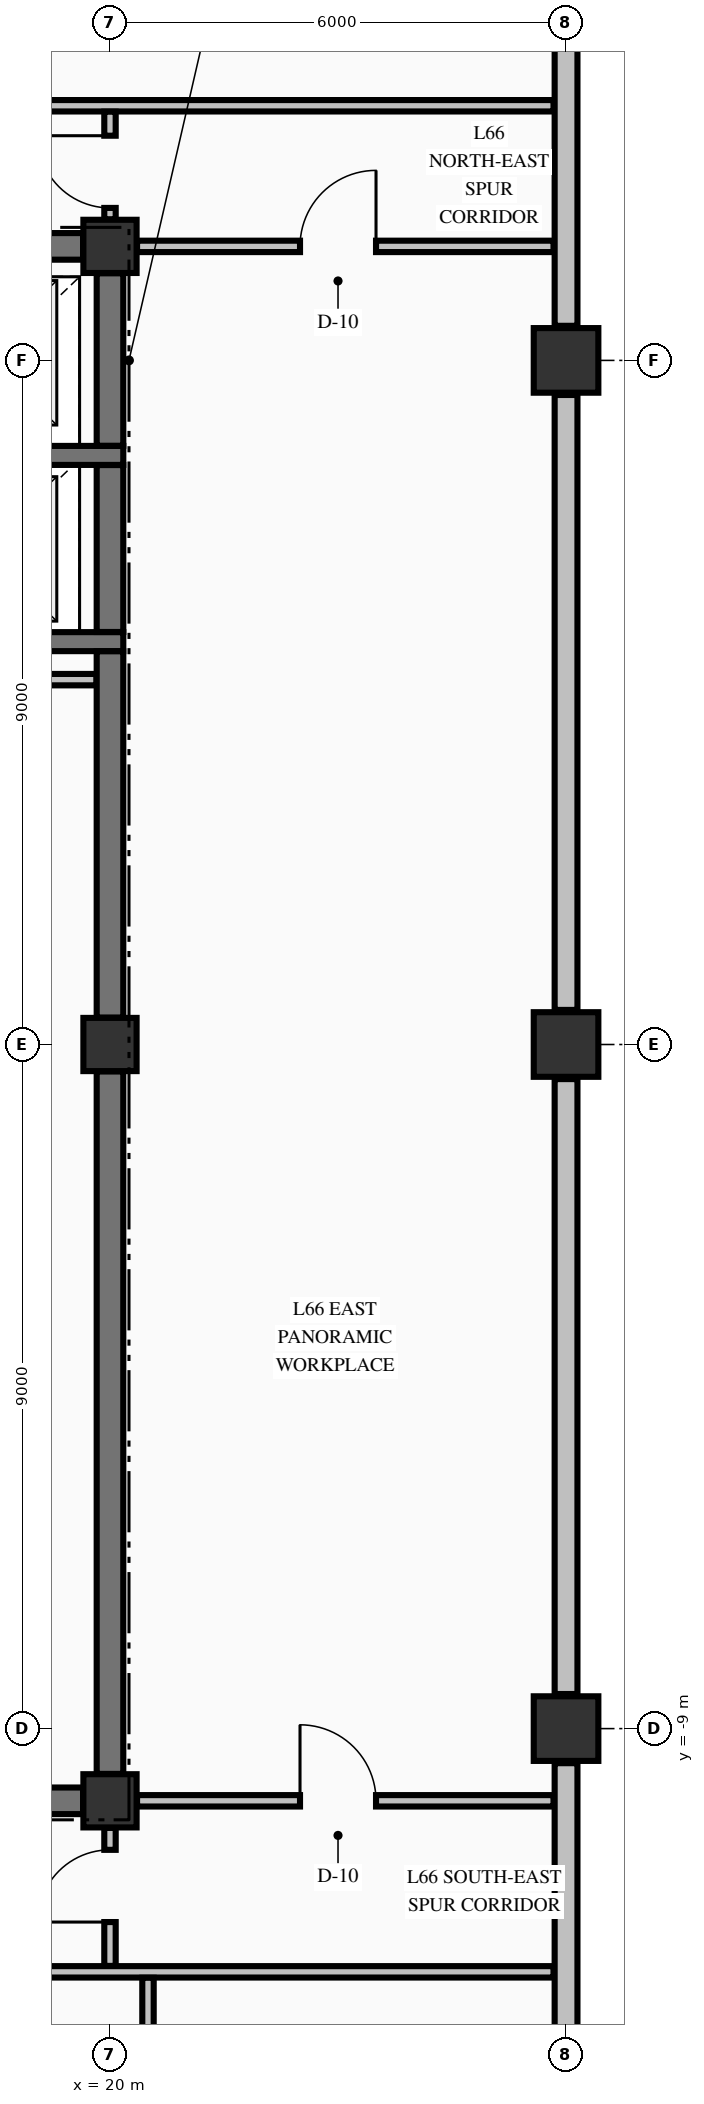
"""IFC4 building model, lengths in metres.
Left out: names, types, materials, properties, quantities, classifications, styles, units other than length and angle.
Written with IfcOpenShell. Run it as: python <this file> out.ifc"""

import sys

from ifc_helpers import new_model, si_unit, direction, frame, frame_2d, origin, origin_2d, place, context, subcontext, project, spatial, rectangle, extrude, element, fill, save


model = new_model("IFC4")
c1 = context("Model", 3, precision=1e-05, world=origin(), true_north=direction((0.0, 1.0)))
c2 = subcontext(c1, "Body", "Model", "MODEL_VIEW")
j1 = project(units=[si_unit("LENGTHUNIT", "METRE"), si_unit("PLANEANGLEUNIT", "RADIAN")], contexts=[c1])
p1 = place(None, origin())
s1 = spatial("IfcSite", under=j1, at=p1, CompositionType="ELEMENT")
p2 = place(p1, origin())
s2 = spatial("IfcBuilding", under=s1, at=p2, CompositionType="ELEMENT")
p3 = place(p2, frame((0.0, 0.0, 249.43)))
s3 = spatial("IfcBuildingStorey", under=s2, at=p3, CompositionType="ELEMENT", Elevation=249.43)
for number, where, z_axis, x_axis in (
    (1, (26.0, -9.0, -0.425), (0.0, 0.0, 1.0), (1.0, 0.0, 0.0)),
    (2, (26.0, 0.0, -0.425), (0.0, 0.0, 1.0), (1.0, 0.0, 0.0)),
    (3, (26.0, 9.0, -0.425), (0.0, 0.0, 1.0), (1.0, 0.0, 0.0)),
):
    element("IfcColumn", number, at=place(p3, frame(where, z_axis=z_axis, x_axis=x_axis)), inside=s3, PredefinedType="COLUMN", context=c2, shape_type="SweptSolid", body=[
        extrude(rectangle(XDim=0.85, YDim=0.85, at=origin_2d()), origin(), (0.0, 0.0, 1.0), 5.0),
    ])
for number, where, z_axis, x_axis in (
    (4, (20.0, -9.95, -0.425), (0.0, 0.0, 1.0), (1.0, 0.0, 0.0)),
    (5, (20.0, 10.5, -0.425), (0.0, 0.0, 1.0), (1.0, 0.0, 0.0)),
    (6, (20.0, 0.0, -0.425), (0.0, 0.0, 1.0), (1.0, 0.0, 0.0)),
):
    element("IfcColumn", number, at=place(p3, frame(where, z_axis=z_axis, x_axis=x_axis)), inside=s3, PredefinedType="COLUMN", context=c2, shape_type="SweptSolid", body=[
        extrude(rectangle(XDim=0.7, YDim=0.7, at=origin_2d()), origin(), (0.0, 0.0, 1.0), 5.0),
    ])
for number, where, z_axis, x_axis in (
    (7, (26.0, -17.545, 0.0), (0.0, 0.0, 1.0), (0.0, 1.0, 0.0)),
    (8, (26.0, -8.545, 0.0), (0.0, 0.0, 1.0), (0.0, 1.0, 0.0)),
    (9, (26.0, 0.455, 0.0), (0.0, 0.0, 1.0), (0.0, 1.0, 0.0)),
    (10, (26.0, 9.455, 0.0), (0.0, 0.0, 1.0), (0.0, 1.0, 0.0)),
):
    element("IfcWall", number, at=place(p3, frame(where, z_axis=z_axis, x_axis=x_axis)), inside=s3, PredefinedType="STANDARD", context=c2, shape_type="SweptSolid", body=[
        extrude(rectangle(XDim=8.09, YDim=0.3, at=frame_2d((4.045, 0.0))), origin(), (0.0, 0.0, 1.0), 2.167),
    ])
p4 = place(p3, frame((14.7, -9.95, 0.0), z_axis=(0.0, 0.0, 1.0), x_axis=(1.0, 0.0, 0.0)))
e11 = element("IfcWall", 11, at=p4, inside=s3, PredefinedType="SHEAR", context=c2, shape_type="SweptSolid", body=[
    extrude(rectangle(XDim=4.946, YDim=0.35, at=frame_2d((2.473, 0.0))), origin(), (0.0, 0.0, 1.0), 4.575),
])
p5 = place(p4, frame((2.125, 0.0, 0.0)))
e12 = element("IfcOpeningElement", 12, at=p5, cuts=e11, PredefinedType="OPENING", context=c2, shape_type="SweptSolid", body=[
    extrude(rectangle(XDim=1.05, YDim=2.15, at=frame_2d((0.525, 1.075))), frame((0.0, 0.185, 0.0), z_axis=(0.0, -1.0, 0.0), x_axis=(1.0, 0.0, 0.0)), (0.0, 0.0, 1.0), 0.37),
])
for number, where, z_axis, x_axis in (
    (13, (17.025, 5.3, 0.0), (0.0, 0.0, 1.0), (1.0, 0.0, 0.0)),
    (14, (17.025, 7.75, 0.0), (0.0, 0.0, 1.0), (1.0, 0.0, 0.0)),
):
    element("IfcWall", number, at=place(p3, frame(where, z_axis=z_axis, x_axis=x_axis)), inside=s3, PredefinedType="SOLIDWALL", context=c2, shape_type="SweptSolid", body=[
        extrude(rectangle(XDim=3.15, YDim=0.25, at=frame_2d((1.575, 0.0))), origin(), (0.0, 0.0, 1.0), 4.575),
    ])
p6 = place(p3, frame((14.7, 10.5, 0.0), z_axis=(0.0, 0.0, 1.0), x_axis=(1.0, 0.0, 0.0)))
e15 = element("IfcWall", 15, at=p6, inside=s3, PredefinedType="SHEAR", context=c2, shape_type="SweptSolid", body=[
    extrude(rectangle(XDim=4.946, YDim=0.35, at=frame_2d((2.473, 0.0))), origin(), (0.0, 0.0, 1.0), 4.575),
])
p7 = place(p6, frame((0.7, 0.0, 0.0)))
e16 = element("IfcOpeningElement", 16, at=p7, cuts=e15, PredefinedType="OPENING", context=c2, shape_type="SweptSolid", body=[
    extrude(rectangle(XDim=1.1, YDim=2.15, at=frame_2d((0.55, 1.075))), frame((0.0, 0.185, 0.0), z_axis=(0.0, -1.0, 0.0), x_axis=(1.0, 0.0, 0.0)), (0.0, 0.0, 1.0), 0.37),
])
p8 = place(p3, frame((-20.075, -12.2, 0.0), z_axis=(0.0, 0.0, 1.0), x_axis=(1.0, 0.0, 0.0)))
e17 = element("IfcWall", 17, at=p8, inside=s3, PredefinedType="PARTITIONING", context=c2, shape_type="SweptSolid", body=[
    extrude(rectangle(XDim=45.91, YDim=0.15, at=frame_2d((22.955, 0.0))), origin(), (0.0, 0.0, 1.0), 4.575),
])
p9 = place(p8, frame((11.88, 0.0, 0.0)))
e18 = element("IfcOpeningElement", 18, at=p9, cuts=e17, PredefinedType="OPENING", context=c2, shape_type="SweptSolid", body=[
    extrude(rectangle(XDim=1.05, YDim=2.15, at=frame_2d((0.525, 1.075))), frame((0.0, 0.085, 0.0), z_axis=(0.0, -1.0, 0.0), x_axis=(1.0, 0.0, 0.0)), (0.0, 0.0, 1.0), 0.17),
])
p10 = place(p8, frame((25.0, 0.0, 0.0)))
e19 = element("IfcOpeningElement", 19, at=p10, cuts=e17, PredefinedType="OPENING", context=c2, shape_type="SweptSolid", body=[
    extrude(rectangle(XDim=1.05, YDim=2.15, at=frame_2d((0.525, 1.075))), frame((0.0, 0.085, 0.0), z_axis=(0.0, -1.0, 0.0), x_axis=(1.0, 0.0, 0.0)), (0.0, 0.0, 1.0), 0.17),
])
p11 = place(p8, frame((34.83, 0.0, 0.0)))
e20 = element("IfcOpeningElement", 20, at=p11, cuts=e17, PredefinedType="OPENING", context=c2, shape_type="SweptSolid", body=[
    extrude(rectangle(XDim=1.05, YDim=2.15, at=frame_2d((0.525, 1.075))), frame((0.0, 0.085, 0.0), z_axis=(0.0, -1.0, 0.0), x_axis=(1.0, 0.0, 0.0)), (0.0, 0.0, 1.0), 0.17),
])
p12 = place(p3, frame((20.356, -9.95, 0.0), z_axis=(0.0, 0.0, 1.0), x_axis=(1.0, 0.0, 0.0)))
e21 = element("IfcWall", 21, at=p12, inside=s3, PredefinedType="PARTITIONING", context=c2, shape_type="SweptSolid", body=[
    extrude(rectangle(XDim=5.479, YDim=0.15, at=frame_2d((2.74, 0.0))), origin(), (0.0, 0.0, 1.0), 4.575),
])
p13 = place(p12, frame((2.144, 0.0, 0.0)))
e22 = element("IfcOpeningElement", 22, at=p13, cuts=e21, PredefinedType="OPENING", context=c2, shape_type="SweptSolid", body=[
    extrude(rectangle(XDim=1.0, YDim=2.15, at=frame_2d((0.5, 1.075))), frame((0.0, 0.085, 0.0), z_axis=(0.0, -1.0, 0.0), x_axis=(1.0, 0.0, 0.0)), (0.0, 0.0, 1.0), 0.17),
])
p14 = place(p3, frame((14.878, 4.8, 0.0), z_axis=(0.0, 0.0, 1.0), x_axis=(1.0, 0.0, 0.0)))
e23 = element("IfcWall", 23, at=p14, inside=s3, PredefinedType="PARTITIONING", context=c2, shape_type="SweptSolid", body=[
    extrude(rectangle(XDim=4.944, YDim=0.15, at=frame_2d((2.472, 0.0))), origin(), (0.0, 0.0, 1.0), 4.575),
])
p15 = place(p3, frame((20.356, 10.5, 0.0), z_axis=(0.0, 0.0, 1.0), x_axis=(1.0, 0.0, 0.0)))
e24 = element("IfcWall", 24, at=p15, inside=s3, PredefinedType="PARTITIONING", context=c2, shape_type="SweptSolid", body=[
    extrude(rectangle(XDim=5.479, YDim=0.15, at=frame_2d((2.74, 0.0))), origin(), (0.0, 0.0, 1.0), 4.575),
])
p16 = place(p15, frame((2.144, 0.0, 0.0)))
e25 = element("IfcOpeningElement", 25, at=p16, cuts=e24, PredefinedType="OPENING", context=c2, shape_type="SweptSolid", body=[
    extrude(rectangle(XDim=1.0, YDim=2.15, at=frame_2d((0.5, 1.075))), frame((0.0, 0.085, 0.0), z_axis=(0.0, -1.0, 0.0), x_axis=(1.0, 0.0, 0.0)), (0.0, 0.0, 1.0), 0.17),
])
p17 = place(p3, frame((-20.075, 12.35, 0.0), z_axis=(0.0, 0.0, 1.0), x_axis=(1.0, 0.0, 0.0)))
e26 = element("IfcWall", 26, at=p17, inside=s3, PredefinedType="PARTITIONING", context=c2, shape_type="SweptSolid", body=[
    extrude(rectangle(XDim=45.91, YDim=0.15, at=frame_2d((22.955, 0.0))), origin(), (0.0, 0.0, 1.0), 2.167),
])
p18 = place(p17, frame((5.75, 0.0, 0.0)))
e27 = element("IfcOpeningElement", 27, at=p18, cuts=e26, PredefinedType="OPENING", context=c2, shape_type="SweptSolid", body=[
    extrude(rectangle(XDim=0.95, YDim=2.02, at=frame_2d((0.475, 1.01))), frame((0.0, 0.085, 0.0), z_axis=(0.0, -1.0, 0.0), x_axis=(1.0, 0.0, 0.0)), (0.0, 0.0, 1.0), 0.17),
])
p19 = place(p17, frame((17.35, 0.0, 0.0)))
e28 = element("IfcOpeningElement", 28, at=p19, cuts=e26, PredefinedType="OPENING", context=c2, shape_type="SweptSolid", body=[
    extrude(rectangle(XDim=0.95, YDim=2.02, at=frame_2d((0.475, 1.01))), frame((0.0, 0.085, 0.0), z_axis=(0.0, -1.0, 0.0), x_axis=(1.0, 0.0, 0.0)), (0.0, 0.0, 1.0), 0.17),
])
p20 = place(p17, frame((32.55, 0.0, 0.0)))
e29 = element("IfcOpeningElement", 29, at=p20, cuts=e26, PredefinedType="OPENING", context=c2, shape_type="SweptSolid", body=[
    extrude(rectangle(XDim=0.95, YDim=2.02, at=frame_2d((0.475, 1.01))), frame((0.0, 0.085, 0.0), z_axis=(0.0, -1.0, 0.0), x_axis=(1.0, 0.0, 0.0)), (0.0, 0.0, 1.0), 0.17),
])
p21 = place(p3, frame((20.0, -9.596, 0.0), z_axis=(0.0, 0.0, 1.0), x_axis=(0.0, 1.0, 0.0)))
e30 = element("IfcWall", 30, at=p21, inside=s3, PredefinedType="SHEAR", context=c2, shape_type="SweptSolid", body=[
    extrude(rectangle(XDim=9.242, YDim=0.35, at=frame_2d((4.621, 0.0))), origin(), (0.0, 0.0, 1.0), 4.575),
])
p22 = place(p3, frame((20.0, 0.354, 0.0), z_axis=(0.0, 0.0, 1.0), x_axis=(0.0, 1.0, 0.0)))
e31 = element("IfcWall", 31, at=p22, inside=s3, PredefinedType="SHEAR", context=c2, shape_type="SweptSolid", body=[
    extrude(rectangle(XDim=4.819, YDim=0.35, at=frame_2d((2.41, 0.0))), origin(), (0.0, 0.0, 1.0), 4.575),
])
p23 = place(p3, frame((20.0, 5.427, 0.0), z_axis=(0.0, 0.0, 1.0), x_axis=(0.0, 1.0, 0.0)))
e32 = element("IfcWall", 32, at=p23, inside=s3, PredefinedType="SHEAR", context=c2, shape_type="SweptSolid", body=[
    extrude(rectangle(XDim=2.196, YDim=0.35, at=frame_2d((1.098, 0.0))), origin(), (0.0, 0.0, 1.0), 4.575),
])
p24 = place(p3, frame((20.0, 7.877, 0.0), z_axis=(0.0, 0.0, 1.0), x_axis=(0.0, 1.0, 0.0)))
e33 = element("IfcWall", 33, at=p24, inside=s3, PredefinedType="SHEAR", context=c2, shape_type="SweptSolid", body=[
    extrude(rectangle(XDim=2.269, YDim=0.35, at=frame_2d((1.135, 0.0))), origin(), (0.0, 0.0, 1.0), 4.575),
])
p25 = place(p3, frame((20.0, -12.122, 0.0), z_axis=(0.0, 0.0, 1.0), x_axis=(0.0, 1.0, 0.0)))
e34 = element("IfcWall", 34, at=p25, inside=s3, PredefinedType="PARTITIONING", context=c2, shape_type="SweptSolid", body=[
    extrude(rectangle(XDim=1.816, YDim=0.15, at=frame_2d((0.908, 0.0))), origin(), (0.0, 0.0, 1.0), 4.575),
])
p26 = place(p25, frame((0.577, 0.0, 0.0)))
e35 = element("IfcOpeningElement", 35, at=p26, cuts=e34, PredefinedType="OPENING", context=c2, shape_type="SweptSolid", body=[
    extrude(rectangle(XDim=0.95, YDim=2.02, at=frame_2d((0.475, 1.01))), frame((0.0, 0.085, 0.0), z_axis=(0.0, -1.0, 0.0), x_axis=(1.0, 0.0, 0.0)), (0.0, 0.0, 1.0), 0.17),
])
p27 = place(p3, frame((20.0, 10.856, 0.0), z_axis=(0.0, 0.0, 1.0), x_axis=(0.0, 1.0, 0.0)))
e36 = element("IfcWall", 36, at=p27, inside=s3, PredefinedType="PARTITIONING", context=c2, shape_type="SweptSolid", body=[
    extrude(rectangle(XDim=1.416, YDim=0.15, at=frame_2d((0.708, 0.0))), origin(), (0.0, 0.0, 1.0), 4.575),
])
p28 = place(p27, frame((0.15, 0.0, 0.0)))
e37 = element("IfcOpeningElement", 37, at=p28, cuts=e36, PredefinedType="OPENING", context=c2, shape_type="SweptSolid", body=[
    extrude(rectangle(XDim=0.95, YDim=2.02, at=frame_2d((0.475, 1.01))), frame((0.0, 0.085, 0.0), z_axis=(0.0, -1.0, 0.0), x_axis=(1.0, 0.0, 0.0)), (0.0, 0.0, 1.0), 0.17),
])
p29 = place(p3, frame((20.5, -17.569, 0.0), z_axis=(0.0, 0.0, 1.0), x_axis=(0.0, 1.0, 0.0)))
e38 = element("IfcWall", 38, at=p29, inside=s3, PredefinedType="PARTITIONING", context=c2, shape_type="SweptSolid", body=[
    extrude(rectangle(XDim=5.291, YDim=0.15, at=frame_2d((2.646, 0.0))), origin(), (0.0, 0.0, 1.0), 2.167),
])
p30 = place(p28, origin())
e39 = element("IfcDoor", 39, at=p30, inside=s3, OperationType="SINGLE_SWING_RIGHT", PredefinedType="DOOR", context=c2, shape_type="SweptSolid", body=[
    extrude(rectangle(XDim=0.95, YDim=2.02, at=frame_2d((0.475, 1.01))), frame((0.0, 0.025, 0.0), z_axis=(0.0, -1.0, 0.0), x_axis=(1.0, 0.0, 0.0)), (0.0, 0.0, 1.0), 0.05),
])
fill(e37, e39)
p31 = place(p26, origin())
e40 = element("IfcDoor", 40, at=p31, inside=s3, OperationType="SINGLE_SWING_LEFT", PredefinedType="DOOR", context=c2, shape_type="SweptSolid", body=[
    extrude(rectangle(XDim=0.95, YDim=2.02, at=frame_2d((0.475, 1.01))), frame((0.0, 0.025, 0.0), z_axis=(0.0, -1.0, 0.0), x_axis=(1.0, 0.0, 0.0)), (0.0, 0.0, 1.0), 0.05),
])
fill(e35, e40)
p32 = place(p16, origin())
e41 = element("IfcDoor", 41, at=p32, inside=s3, OperationType="SINGLE_SWING_RIGHT", PredefinedType="DOOR", context=c2, shape_type="SweptSolid", body=[
    extrude(rectangle(XDim=1.0, YDim=2.15, at=frame_2d((0.5, 1.075))), frame((0.0, 0.025, 0.0), z_axis=(0.0, -1.0, 0.0), x_axis=(1.0, 0.0, 0.0)), (0.0, 0.0, 1.0), 0.05),
])
fill(e25, e41)
p33 = place(p13, origin())
e42 = element("IfcDoor", 42, at=p33, inside=s3, OperationType="SINGLE_SWING_LEFT", PredefinedType="DOOR", context=c2, shape_type="SweptSolid", body=[
    extrude(rectangle(XDim=1.0, YDim=2.15, at=frame_2d((0.5, 1.075))), frame((0.0, 0.025, 0.0), z_axis=(0.0, -1.0, 0.0), x_axis=(1.0, 0.0, 0.0)), (0.0, 0.0, 1.0), 0.05),
])
fill(e22, e42)
save(model, sys.argv[1])
